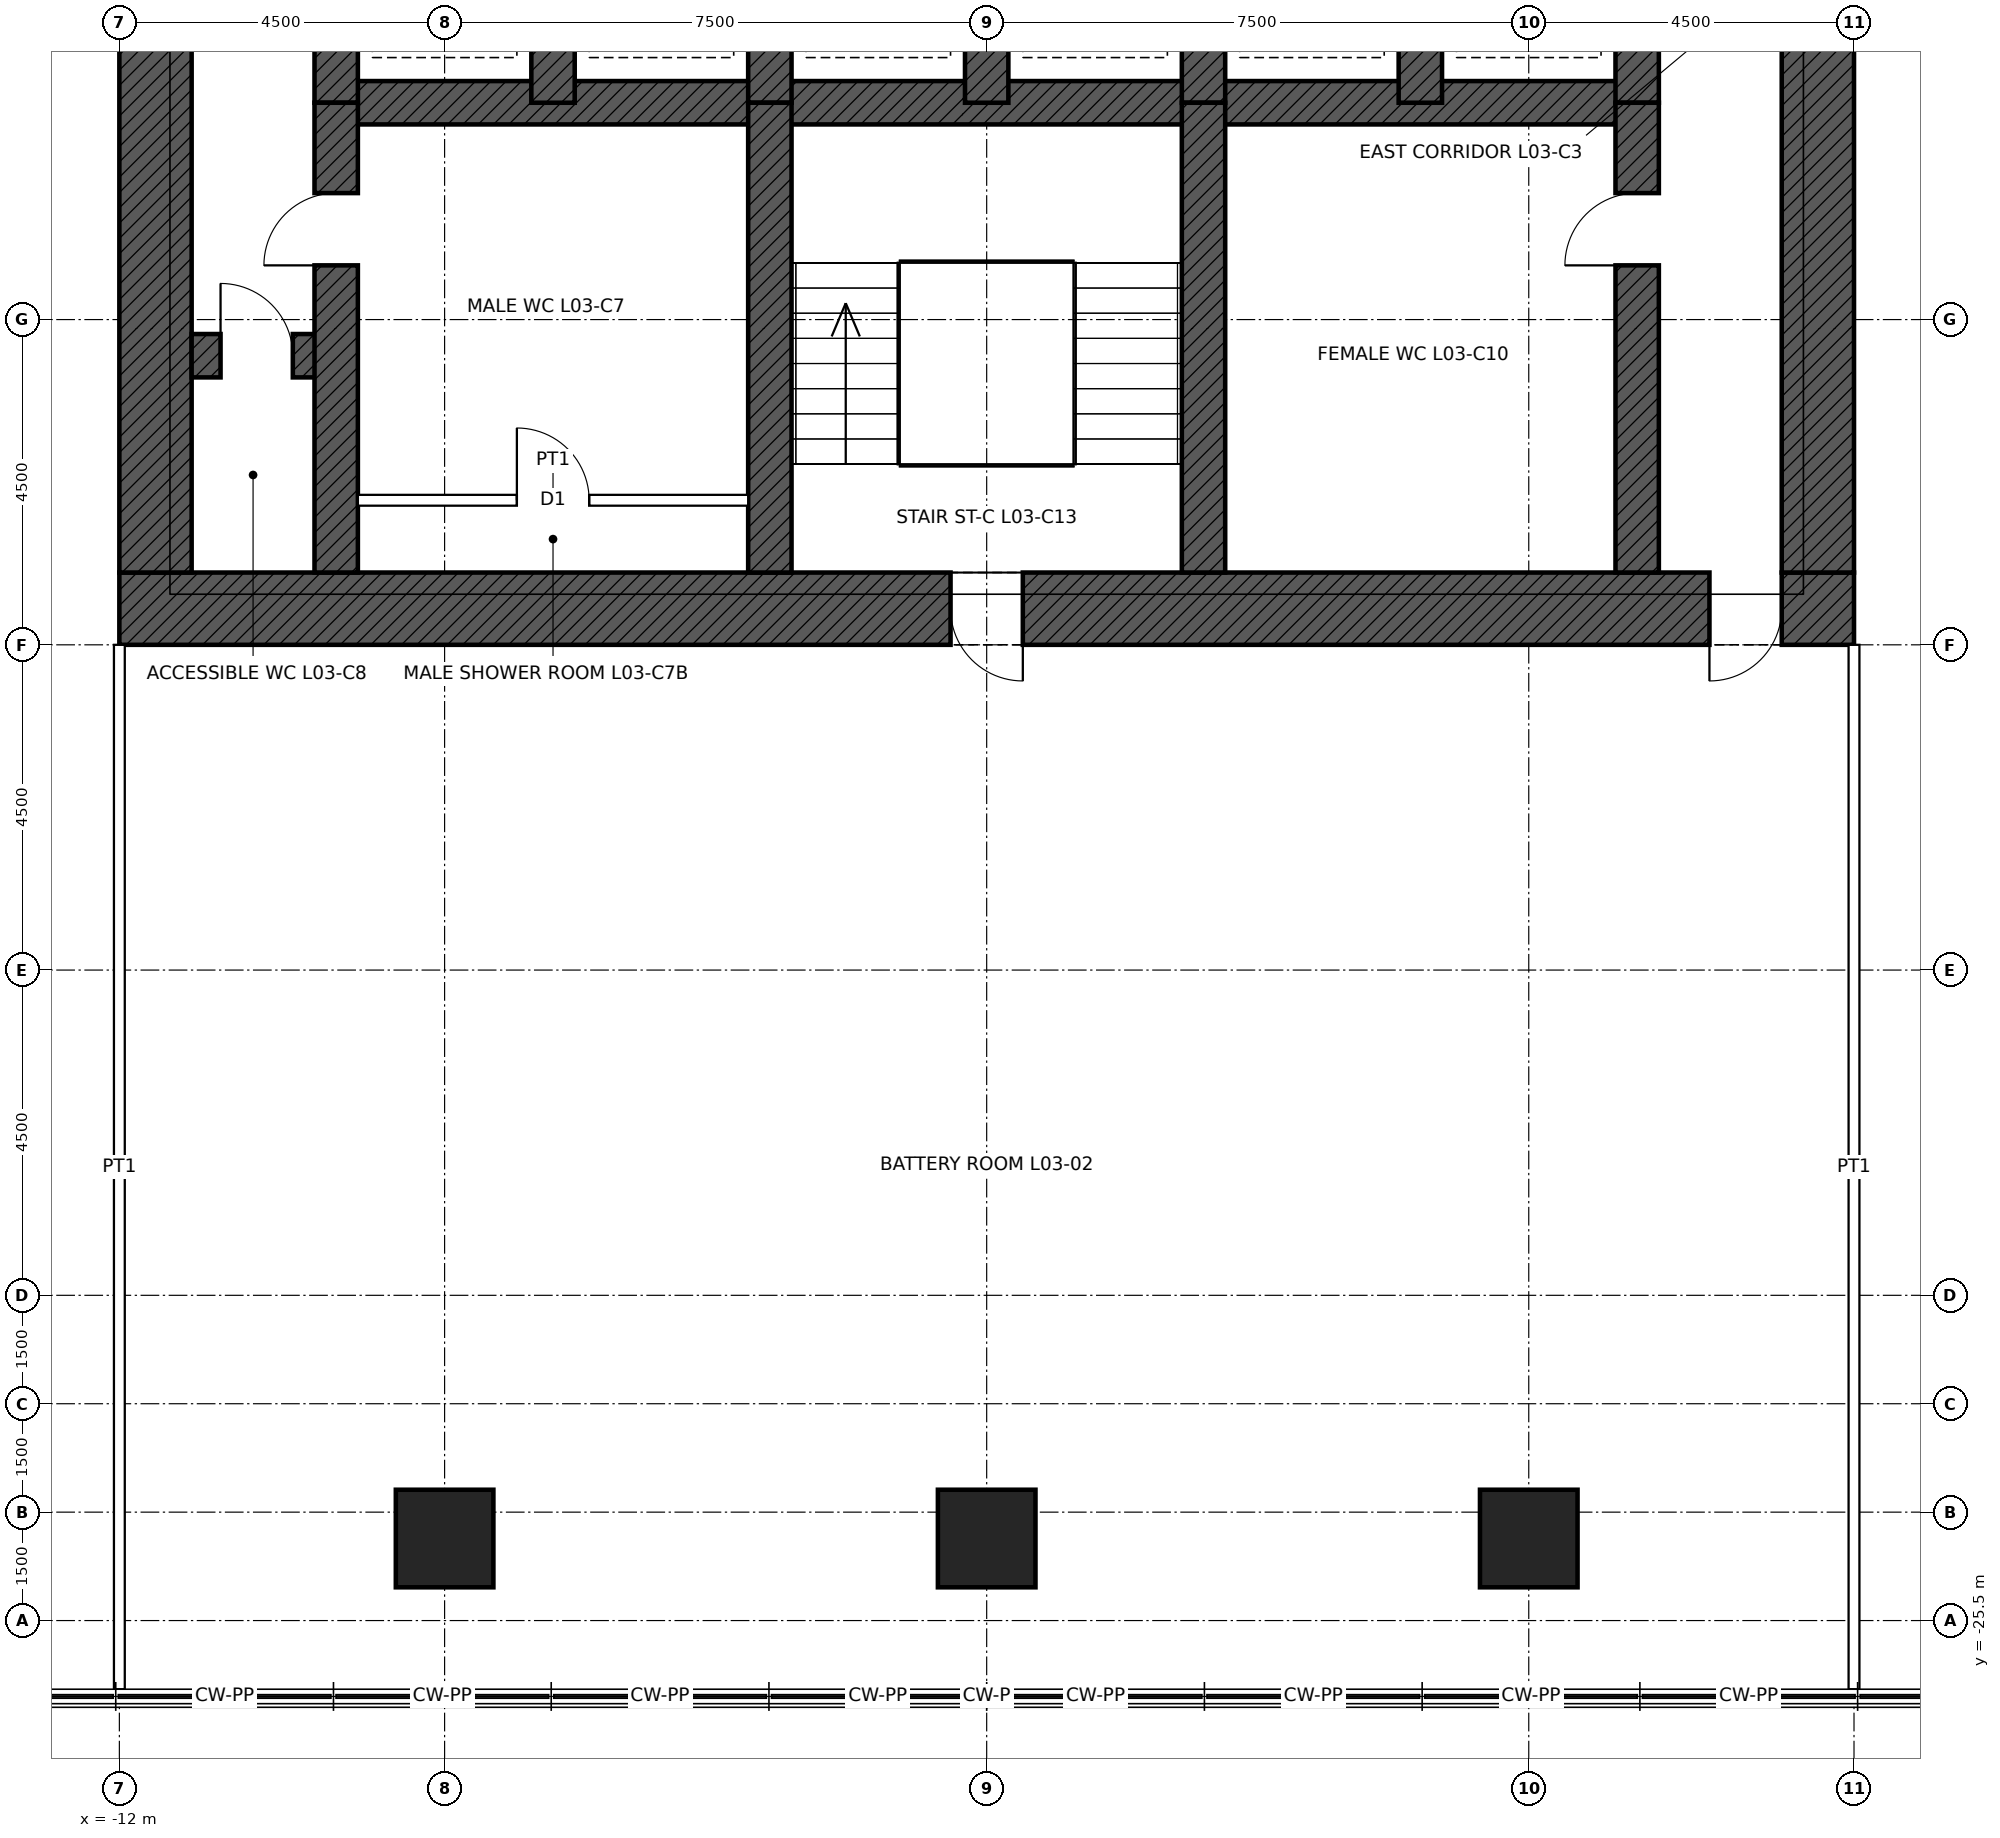
"""IFC4 building model, lengths in metres.
Left out: names, types, materials, properties, quantities, classifications, styles, units other than length and angle.
Written with IfcOpenShell. Run it as: python <this file> out.ifc"""

import sys

from ifc_helpers import new_model, si_unit, direction, frame, frame_2d, origin, origin_2d, place, context, subcontext, project, spatial, rectangle, hollow_rectangle, extrude, element, fill, save


model = new_model("IFC4")
c1 = context("Model", 3, precision=1e-05, world=origin(), true_north=direction((0.0, 1.0)))
c2 = subcontext(c1, "Body", "Model", "MODEL_VIEW")
j1 = project(units=[si_unit("LENGTHUNIT", "METRE"), si_unit("PLANEANGLEUNIT", "RADIAN")], contexts=[c1])
p1 = place(None, origin())
s1 = spatial("IfcSite", under=j1, at=p1, CompositionType="ELEMENT")
p2 = place(p1, origin())
s2 = spatial("IfcBuilding", under=s1, at=p2, CompositionType="ELEMENT")
p3 = place(p2, frame((0.0, 0.0, 18.0)))
s3 = spatial("IfcBuildingStorey", under=s2, at=p3, CompositionType="ELEMENT", Elevation=18.0)
for number, where, z_axis, x_axis in (
    (1, (7.5, -24.365, 0.0), (0.0, 0.0, 1.0), (1.0, 0.0, 0.0)),
    (2, (0.0, -24.365, 0.0), (0.0, 0.0, 1.0), (1.0, 0.0, 0.0)),
    (3, (-7.5, -24.365, 0.0), (0.0, 0.0, 1.0), (1.0, 0.0, 0.0)),
):
    element("IfcColumn", number, at=place(p3, frame(where, z_axis=z_axis, x_axis=x_axis)), inside=s3, PredefinedType="COLUMN", context=c2, shape_type="SweptSolid", body=[
        extrude(hollow_rectangle(XDim=1.35, YDim=1.35, WallThickness=0.1, at=origin_2d()), origin(), (0.0, 0.0, 1.0), 5.4),
    ])
p4 = place(p3, frame((12.0, -11.5, 0.0), z_axis=(0.0, 0.0, 1.0), x_axis=(-1.0, 0.0, 0.0)))
e4 = element("IfcWall", 4, at=p4, inside=s3, PredefinedType="SHEAR", context=c2, shape_type="SweptSolid", body=[
    extrude(rectangle(XDim=24.0, YDim=1.0, at=frame_2d((12.0, 0.0))), origin(), (0.0, 0.0, 1.0), 5.4),
])
p5 = place(p4, frame((11.5, 0.0, 0.0)))
e5 = element("IfcOpeningElement", 5, at=p5, cuts=e4, PredefinedType="OPENING", context=c2, shape_type="SweptSolid", body=[
    extrude(rectangle(XDim=1.0, YDim=2.1, at=frame_2d((0.5, 1.05))), frame((0.0, 0.51, 0.0), z_axis=(0.0, -1.0, 0.0), x_axis=(1.0, 0.0, 0.0)), (0.0, 0.0, 1.0), 1.02),
])
p6 = place(p4, frame((1.0, 0.0, 0.0)))
e6 = element("IfcOpeningElement", 6, at=p6, cuts=e4, PredefinedType="OPENING", context=c2, shape_type="SweptSolid", body=[
    extrude(rectangle(XDim=1.0, YDim=2.4, at=frame_2d((0.5, 1.2))), frame((0.0, 0.51, 0.0), z_axis=(0.0, -1.0, 0.0), x_axis=(1.0, 0.0, 0.0)), (0.0, 0.0, 1.0), 1.02),
])
p7 = place(p3, frame((11.5, 11.0, 0.0), z_axis=(0.0, 0.0, 1.0), x_axis=(0.0, -1.0, 0.0)))
e7 = element("IfcWall", 7, at=p7, inside=s3, PredefinedType="SHEAR", context=c2, shape_type="SweptSolid", body=[
    extrude(rectangle(XDim=22.0, YDim=1.0, at=frame_2d((11.0, 0.0))), origin(), (0.0, 0.0, 1.0), 5.4),
])
p8 = place(p7, frame((10.5, 0.0, 0.0)))
e8 = element("IfcOpeningElement", 8, at=p8, cuts=e7, PredefinedType="OPENING", context=c2, shape_type="SweptSolid", body=[
    extrude(rectangle(XDim=1.0, YDim=2.4, at=frame_2d((0.5, 1.2))), frame((0.0, 0.51, 0.0), z_axis=(0.0, -1.0, 0.0), x_axis=(1.0, 0.0, 0.0)), (0.0, 0.0, 1.0), 1.02),
])
p9 = place(p3, frame((-11.5, -11.0, 0.0), z_axis=(0.0, 0.0, 1.0), x_axis=(0.0, 1.0, 0.0)))
e9 = element("IfcWall", 9, at=p9, inside=s3, PredefinedType="SHEAR", context=c2, shape_type="SweptSolid", body=[
    extrude(rectangle(XDim=22.0, YDim=1.0, at=frame_2d((11.0, 0.0))), origin(), (0.0, 0.0, 1.0), 5.4),
])
p10 = place(p9, frame((10.5, 0.0, 0.0)))
e10 = element("IfcOpeningElement", 10, at=p10, cuts=e9, PredefinedType="OPENING", context=c2, shape_type="SweptSolid", body=[
    extrude(rectangle(XDim=1.0, YDim=2.4, at=frame_2d((0.5, 1.2))), frame((0.0, 0.51, 0.0), z_axis=(0.0, -1.0, 0.0), x_axis=(1.0, 0.0, 0.0)), (0.0, 0.0, 1.0), 1.02),
])
p11 = place(p3, frame((-9.0, -4.5, 0.0), z_axis=(0.0, 0.0, 1.0), x_axis=(1.0, 0.0, 0.0)))
e11 = element("IfcWall", 11, at=p11, inside=s3, PredefinedType="SHEAR", context=c2, shape_type="SweptSolid", body=[
    extrude(rectangle(XDim=18.0, YDim=0.6, at=frame_2d((9.0, 0.0))), origin(), (0.0, 0.0, 1.0), 5.4),
])
p12 = place(p3, frame((-11.0, -8.0, 0.0), z_axis=(0.0, 0.0, 1.0), x_axis=(1.0, 0.0, 0.0)))
e12 = element("IfcWall", 12, at=p12, inside=s3, PredefinedType="SHEAR", context=c2, shape_type="SweptSolid", body=[
    extrude(rectangle(XDim=2.0, YDim=0.6, at=frame_2d((1.0, 0.0))), origin(), (0.0, 0.0, 1.0), 5.4),
])
p13 = place(p12, frame((0.4, 0.0, 0.0)))
e13 = element("IfcOpeningElement", 13, at=p13, cuts=e12, PredefinedType="OPENING", context=c2, shape_type="SweptSolid", body=[
    extrude(rectangle(XDim=1.0, YDim=2.1, at=frame_2d((0.5, 1.05))), frame((0.0, 0.31, 0.0), z_axis=(0.0, -1.0, 0.0), x_axis=(1.0, 0.0, 0.0)), (0.0, 0.0, 1.0), 0.62),
])
for number, where, z_axis, x_axis in (
    (14, (-9.0, -4.5, 0.0), (0.0, 0.0, 1.0), (0.0, 1.0, 0.0)),
    (15, (9.0, -4.5, 0.0), (0.0, 0.0, 1.0), (0.0, 1.0, 0.0)),
    (16, (-6.0, -4.5, 0.0), (0.0, 0.0, 1.0), (0.0, 1.0, 0.0)),
    (17, (-3.0, -4.5, 0.0), (0.0, 0.0, 1.0), (0.0, 1.0, 0.0)),
    (18, (0.0, -4.5, 0.0), (0.0, 0.0, 1.0), (0.0, 1.0, 0.0)),
    (19, (3.0, -4.5, 0.0), (0.0, 0.0, 1.0), (0.0, 1.0, 0.0)),
    (20, (6.0, -4.5, 0.0), (0.0, 0.0, 1.0), (0.0, 1.0, 0.0)),
):
    element("IfcWall", number, at=place(p3, frame(where, z_axis=z_axis, x_axis=x_axis)), inside=s3, PredefinedType="SHEAR", context=c2, shape_type="SweptSolid", body=[
        extrude(rectangle(XDim=3.0, YDim=0.6, at=frame_2d((1.5, 0.0))), origin(), (0.0, 0.0, 1.0), 5.4),
    ])
p14 = place(p3, frame((-9.0, -11.0, 0.0), z_axis=(0.0, 0.0, 1.0), x_axis=(0.0, 1.0, 0.0)))
e21 = element("IfcWall", 21, at=p14, inside=s3, PredefinedType="SHEAR", context=c2, shape_type="SweptSolid", body=[
    extrude(rectangle(XDim=6.5, YDim=0.6, at=frame_2d((3.25, 0.0))), origin(), (0.0, 0.0, 1.0), 5.4),
])
p15 = place(p14, frame((4.25, 0.0, 0.0)))
e22 = element("IfcOpeningElement", 22, at=p15, cuts=e21, PredefinedType="OPENING", context=c2, shape_type="SweptSolid", body=[
    extrude(rectangle(XDim=1.0, YDim=2.1, at=frame_2d((0.5, 1.05))), frame((0.0, 0.31, 0.0), z_axis=(0.0, -1.0, 0.0), x_axis=(1.0, 0.0, 0.0)), (0.0, 0.0, 1.0), 0.62),
])
p16 = place(p3, frame((9.0, -11.0, 0.0), z_axis=(0.0, 0.0, 1.0), x_axis=(0.0, 1.0, 0.0)))
e23 = element("IfcWall", 23, at=p16, inside=s3, PredefinedType="SHEAR", context=c2, shape_type="SweptSolid", body=[
    extrude(rectangle(XDim=6.5, YDim=0.6, at=frame_2d((3.25, 0.0))), origin(), (0.0, 0.0, 1.0), 5.4),
])
p17 = place(p16, frame((4.25, 0.0, 0.0)))
e24 = element("IfcOpeningElement", 24, at=p17, cuts=e23, PredefinedType="OPENING", context=c2, shape_type="SweptSolid", body=[
    extrude(rectangle(XDim=1.0, YDim=2.1, at=frame_2d((0.5, 1.05))), frame((0.0, 0.31, 0.0), z_axis=(0.0, -1.0, 0.0), x_axis=(1.0, 0.0, 0.0)), (0.0, 0.0, 1.0), 0.62),
])
for number, where, z_axis, x_axis in (
    (25, (-3.0, -11.0, 0.0), (0.0, 0.0, 1.0), (0.0, 1.0, 0.0)),
    (26, (3.0, -11.0, 0.0), (0.0, 0.0, 1.0), (0.0, 1.0, 0.0)),
):
    element("IfcWall", number, at=place(p3, frame(where, z_axis=z_axis, x_axis=x_axis)), inside=s3, PredefinedType="SHEAR", context=c2, shape_type="SweptSolid", body=[
        extrude(rectangle(XDim=6.5, YDim=0.6, at=frame_2d((3.25, 0.0))), origin(), (0.0, 0.0, 1.0), 5.4),
    ])
p18 = place(p3, frame((-12.0, -12.0, 0.0), z_axis=(0.0, 0.0, 1.0), x_axis=(0.0, -1.0, 0.0)))
e27 = element("IfcWall", 27, at=p18, inside=s3, PredefinedType="PARTITIONING", context=c2, shape_type="SweptSolid", body=[
    extrude(rectangle(XDim=14.45, YDim=0.15, at=frame_2d((7.225, 0.0))), origin(), (0.0, 0.0, 1.0), 5.2),
])
p19 = place(p3, frame((12.0, -12.0, 0.0), z_axis=(0.0, 0.0, 1.0), x_axis=(0.0, -1.0, 0.0)))
e28 = element("IfcWall", 28, at=p19, inside=s3, PredefinedType="PARTITIONING", context=c2, shape_type="SweptSolid", body=[
    extrude(rectangle(XDim=14.45, YDim=0.15, at=frame_2d((7.225, 0.0))), origin(), (0.0, 0.0, 1.0), 4.164),
])
p20 = place(p3, frame((-8.7, -10.0, 0.0), z_axis=(0.0, 0.0, 1.0), x_axis=(1.0, 0.0, 0.0)))
e29 = element("IfcWall", 29, at=p20, inside=s3, PredefinedType="PARTITIONING", context=c2, shape_type="SweptSolid", body=[
    extrude(rectangle(XDim=5.4, YDim=0.15, at=frame_2d((2.7, 0.0))), origin(), (0.0, 0.0, 1.0), 5.15),
])
p21 = place(p20, frame((2.2, 0.0, 0.0)))
e30 = element("IfcOpeningElement", 30, at=p21, cuts=e29, PredefinedType="OPENING", context=c2, shape_type="SweptSolid", body=[
    extrude(rectangle(XDim=1.0, YDim=2.1, at=frame_2d((0.5, 1.05))), frame((0.0, 0.085, 0.0), z_axis=(0.0, -1.0, 0.0), x_axis=(1.0, 0.0, 0.0)), (0.0, 0.0, 1.0), 0.17),
])
p22 = place(p5, origin())
e31 = element("IfcDoor", 31, at=p22, inside=s3, OperationType="SINGLE_SWING_LEFT", PredefinedType="DOOR", context=c2, shape_type="SweptSolid", body=[
    extrude(rectangle(XDim=1.0, YDim=2.1, at=frame_2d((0.5, 1.05))), frame((0.0, 0.485, 0.0), z_axis=(0.0, -1.0, 0.0), x_axis=(1.0, 0.0, 0.0)), (0.0, 0.0, 1.0), 0.05),
])
fill(e5, e31)
p23 = place(p6, origin())
e32 = element("IfcDoor", 32, at=p23, inside=s3, OperationType="SINGLE_SWING_RIGHT", PredefinedType="DOOR", context=c2, shape_type="SweptSolid", body=[
    extrude(rectangle(XDim=1.0, YDim=2.4, at=frame_2d((0.5, 1.2))), frame((0.0, 0.485, 0.0), z_axis=(0.0, -1.0, 0.0), x_axis=(1.0, 0.0, 0.0)), (0.0, 0.0, 1.0), 0.05),
])
fill(e6, e32)
p24 = place(p15, origin())
e33 = element("IfcDoor", 33, at=p24, inside=s3, OperationType="SINGLE_SWING_LEFT", PredefinedType="DOOR", context=c2, shape_type="SweptSolid", body=[
    extrude(rectangle(XDim=1.0, YDim=2.1, at=frame_2d((0.5, 1.05))), frame((0.0, 0.025, 0.0), z_axis=(0.0, -1.0, 0.0), x_axis=(1.0, 0.0, 0.0)), (0.0, 0.0, 1.0), 0.05),
])
fill(e22, e33)
p25 = place(p17, origin())
e34 = element("IfcDoor", 34, at=p25, inside=s3, OperationType="SINGLE_SWING_LEFT", PredefinedType="DOOR", context=c2, shape_type="SweptSolid", body=[
    extrude(rectangle(XDim=1.0, YDim=2.1, at=frame_2d((0.5, 1.05))), frame((0.0, 0.025, 0.0), z_axis=(0.0, -1.0, 0.0), x_axis=(1.0, 0.0, 0.0)), (0.0, 0.0, 1.0), 0.05),
])
fill(e24, e34)
p26 = place(p13, origin())
e35 = element("IfcDoor", 35, at=p26, inside=s3, OperationType="SINGLE_SWING_LEFT", PredefinedType="DOOR", context=c2, shape_type="SweptSolid", body=[
    extrude(rectangle(XDim=1.0, YDim=2.1, at=frame_2d((0.5, 1.05))), frame((0.0, 0.025, 0.0), z_axis=(0.0, -1.0, 0.0), x_axis=(1.0, 0.0, 0.0)), (0.0, 0.0, 1.0), 0.05),
])
fill(e13, e35)
p27 = place(p21, origin())
e36 = element("IfcDoor", 36, at=p27, inside=s3, OperationType="SINGLE_SWING_LEFT", PredefinedType="DOOR", context=c2, shape_type="SweptSolid", body=[
    extrude(rectangle(XDim=1.0, YDim=2.1, at=frame_2d((0.5, 1.05))), frame((0.0, 0.025, 0.0), z_axis=(0.0, -1.0, 0.0), x_axis=(1.0, 0.0, 0.0)), (0.0, 0.0, 1.0), 0.05),
])
fill(e30, e36)
save(model, sys.argv[1])
